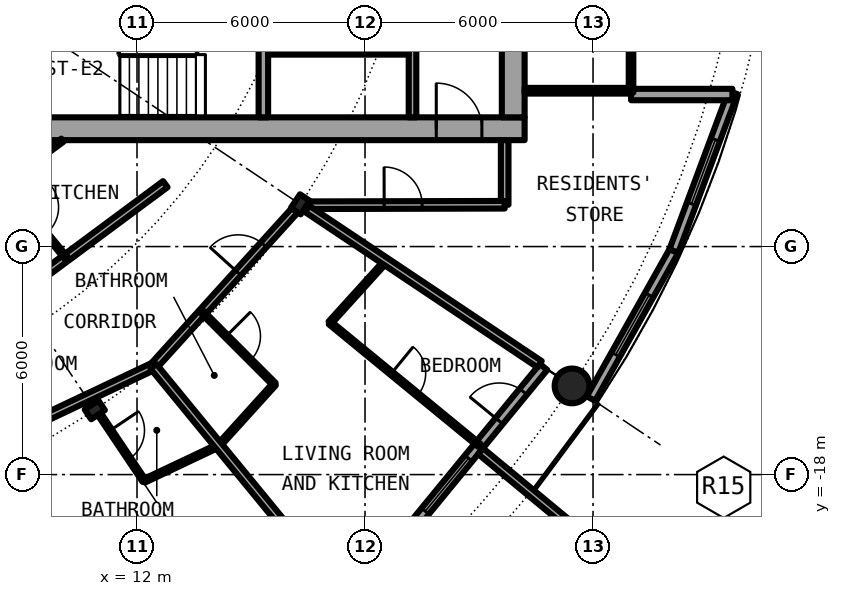
"""IFC4 building model, lengths in metres.
Left out: names, types, materials, properties, quantities, classifications, styles, units other than length and angle.
Written with IfcOpenShell. Run it as: python <this file> out.ifc"""

import sys

from ifc_helpers import new_model, si_unit, direction, frame, frame_2d, origin, origin_2d, place, context, subcontext, project, spatial, rectangle, hollow_circle, i_section, extrude, element, fill, save


model = new_model("IFC4")
c1 = context("Model", 3, precision=1e-05, world=origin(), true_north=direction((0.0, 1.0)))
c2 = subcontext(c1, "Body", "Model", "MODEL_VIEW")
j1 = project(units=[si_unit("LENGTHUNIT", "METRE"), si_unit("PLANEANGLEUNIT", "RADIAN")], contexts=[c1])
p1 = place(None, origin())
s1 = spatial("IfcSite", under=j1, at=p1, CompositionType="ELEMENT")
p2 = place(p1, origin())
s2 = spatial("IfcBuilding", under=s1, at=p2, CompositionType="ELEMENT")
p3 = place(p2, frame((0.0, 0.0, 111.65)))
s3 = spatial("IfcBuildingStorey", under=s2, at=p3, CompositionType="ELEMENT", Elevation=111.65)
p4 = place(p3, frame((23.448, -15.667, 0.0), z_axis=(0.0, 0.0, 1.0), x_axis=(1.0, 0.0, 0.0)))
e1 = element("IfcColumn", 1, at=p4, inside=s3, PredefinedType="COLUMN", context=c2, shape_type="SweptSolid", body=[
    extrude(hollow_circle(Radius=0.457, WallThickness=0.04, at=origin_2d()), origin(), (0.0, 0.0, 1.0), 3.05),
])
for number, where, z_axis, x_axis in (
    (2, (10.889, -16.297, 0.0), (0.0, 0.0, 1.0), (0.556, -0.831, 0.0)),
    (3, (16.297, -10.889, 0.0), (0.0, 0.0, 1.0), (0.831, -0.556, 0.0)),
):
    element("IfcColumn", number, at=place(p3, frame(where, z_axis=z_axis, x_axis=x_axis)), inside=s3, PredefinedType="COLUMN", context=c2, shape_type="SweptSolid", body=[
        extrude(i_section(OverallWidth=0.307, OverallDepth=0.432, WebThickness=0.021, FlangeThickness=0.04, FilletRadius=0.027, at=origin_2d()), origin(), (0.0, 0.0, 1.0), 3.05),
    ])
p5 = place(p3, frame((19.304, -19.304, 0.0), z_axis=(0.0, 0.0, 1.0), x_axis=(0.634382322723, 0.773019449054, 0.0)))
e4 = element("IfcWall", 4, at=p5, inside=s3, PredefinedType="SOLIDWALL", context=c2, shape_type="SweptSolid", body=[
    extrude(rectangle(XDim=5.352, YDim=0.25, at=frame_2d((2.676, 0.0))), origin(), (0.0, 0.0, 1.0), 2.7),
])
p6 = place(p5, frame((0.441, 0.0, 0.3)))
e5 = element("IfcOpeningElement", 5, at=p6, cuts=e4, PredefinedType="OPENING", context=c2, shape_type="SweptSolid", body=[
    extrude(rectangle(XDim=1.8, YDim=2.1, at=frame_2d((0.9, 1.05))), frame((0.0, 0.135, 0.0), z_axis=(0.0, -1.0, 0.0), x_axis=(1.0, 0.0, 0.0)), (0.0, 0.0, 1.0), 0.27),
])
p7 = place(p5, frame((3.51, 0.0, 0.0)))
e6 = element("IfcOpeningElement", 6, at=p7, cuts=e4, PredefinedType="OPENING", context=c2, shape_type="SweptSolid", body=[
    extrude(rectangle(XDim=1.0, YDim=2.2, at=frame_2d((0.5, 1.1))), frame((0.0, 0.135, 0.0), z_axis=(0.0, -1.0, 0.0), x_axis=(1.0, 0.0, 0.0)), (0.0, 0.0, 1.0), 0.27),
])
p8 = place(p3, frame((21.041, -17.384, -0.03), z_axis=(0.0, 0.0, 1.0), x_axis=(0.770784861449, -0.63709551667, 0.0)))
e7 = element("IfcWall", 7, at=p8, inside=s3, PredefinedType="SOLIDWALL", context=c2, shape_type="SweptSolid", body=[
    extrude(rectangle(XDim=3.006, YDim=0.2, at=frame_2d((1.503, 0.0))), origin(), (0.0, 0.0, 1.0), 2.73),
])
p9 = place(p3, frame((23.946, -16.0, 0.0), z_axis=(0.0, 0.0, 1.0), x_axis=(0.489696356642, 0.871893042919, 0.0)))
e8 = element("IfcWall", 8, at=p9, inside=s3, PredefinedType="SOLIDWALL", context=c2, shape_type="SweptSolid", body=[
    extrude(rectangle(XDim=4.454, YDim=0.25, at=frame_2d((2.227, 0.0))), origin(), (0.0, 0.0, 1.0), 2.7),
])
p10 = place(p9, frame((1.327, 0.0, 0.3)))
e9 = element("IfcOpeningElement", 9, at=p10, cuts=e8, PredefinedType="OPENING", context=c2, shape_type="SweptSolid", body=[
    extrude(rectangle(XDim=1.8, YDim=2.1, at=frame_2d((0.9, 1.05))), frame((0.0, 0.135, 0.0), z_axis=(0.0, -1.0, 0.0), x_axis=(1.0, 0.0, 0.0)), (0.0, 0.0, 1.0), 0.27),
])
p11 = place(p3, frame((26.127, -12.117, 0.0), z_axis=(0.0, 0.0, 1.0), x_axis=(0.349247811493, 0.937030397675, 0.0)))
e10 = element("IfcWall", 10, at=p11, inside=s3, PredefinedType="SOLIDWALL", context=c2, shape_type="SweptSolid", body=[
    extrude(rectangle(XDim=4.452, YDim=0.25, at=frame_2d((2.226, 0.0))), origin(), (0.0, 0.0, 1.0), 2.7),
])
p12 = place(p11, frame((1.327, 0.0, 0.3)))
e11 = element("IfcOpeningElement", 11, at=p12, cuts=e10, PredefinedType="OPENING", context=c2, shape_type="SweptSolid", body=[
    extrude(rectangle(XDim=1.8, YDim=2.1, at=frame_2d((0.9, 1.05))), frame((0.0, 0.135, 0.0), z_axis=(0.0, -1.0, 0.0), x_axis=(1.0, 0.0, 0.0)), (0.0, 0.0, 1.0), 0.27),
])
p13 = place(p3, frame((25.0, -8.0, 0.0), z_axis=(0.0, 0.0, 1.0), x_axis=(1.0, 0.0, 0.0)))
e12 = element("IfcWall", 12, at=p13, inside=s3, PredefinedType="SOLIDWALL", context=c2, shape_type="SweptSolid", body=[
    extrude(rectangle(XDim=2.667, YDim=0.3, at=frame_2d((1.333, 0.0))), origin(), (0.0, 0.0, 1.0), 2.7),
])
p14 = place(p3, frame((8.4, -8.9, 0.0), z_axis=(0.0, 0.0, 1.0), x_axis=(1.0, 0.0, 0.0)))
e13 = element("IfcWall", 13, at=p14, inside=s3, PredefinedType="SHEAR", context=c2, shape_type="SweptSolid", body=[
    extrude(rectangle(XDim=13.8, YDim=0.6, at=frame_2d((6.9, 0.0))), origin(), (0.0, 0.0, 1.0), 3.05),
])
p15 = place(p14, frame((11.475, 0.0, 0.0)))
e14 = element("IfcOpeningElement", 14, at=p15, cuts=e13, PredefinedType="OPENING", context=c2, shape_type="SweptSolid", body=[
    extrude(rectangle(XDim=1.2, YDim=2.3, at=frame_2d((0.6, 1.15))), frame((0.0, 0.31, 0.0), z_axis=(0.0, -1.0, 0.0), x_axis=(1.0, 0.0, 0.0)), (0.0, 0.0, 1.0), 0.62),
])
p16 = place(p3, frame((21.9, 8.6, 0.0), z_axis=(0.0, 0.0, 1.0), x_axis=(0.0, -1.0, 0.0)))
e15 = element("IfcWall", 15, at=p16, inside=s3, PredefinedType="SHEAR", context=c2, shape_type="SweptSolid", body=[
    extrude(rectangle(XDim=17.2, YDim=0.6, at=frame_2d((8.6, 0.0))), origin(), (0.0, 0.0, 1.0), 3.05),
])
p17 = place(p16, frame((7.7, 0.0, 0.0)))
e16 = element("IfcOpeningElement", 16, at=p17, cuts=e15, PredefinedType="OPENING", context=c2, shape_type="SweptSolid", body=[
    extrude(rectangle(XDim=1.8, YDim=2.3, at=frame_2d((0.9, 1.15))), frame((0.0, 0.31, 0.0), z_axis=(0.0, -1.0, 0.0), x_axis=(1.0, 0.0, 0.0)), (0.0, 0.0, 1.0), 0.62),
])
p18 = place(p3, frame((15.325, -8.6, 0.0), z_axis=(0.0, 0.0, 1.0), x_axis=(0.0, 1.0, 0.0)))
e17 = element("IfcWall", 17, at=p18, inside=s3, PredefinedType="SHEAR", context=c2, shape_type="SweptSolid", body=[
    extrude(rectangle(XDim=3.95, YDim=0.25, at=frame_2d((1.975, 0.0))), origin(), (0.0, 0.0, 1.0), 3.05),
])
p19 = place(p18, frame((2.025, 0.0, 0.0)))
e18 = element("IfcOpeningElement", 18, at=p19, cuts=e17, PredefinedType="OPENING", context=c2, shape_type="SweptSolid", body=[
    extrude(rectangle(XDim=1.2, YDim=2.3, at=frame_2d((0.6, 1.15))), frame((0.0, 0.135, 0.0), z_axis=(0.0, -1.0, 0.0), x_axis=(1.0, 0.0, 0.0)), (0.0, 0.0, 1.0), 0.27),
])
p20 = place(p3, frame((19.25, -8.6, 0.0), z_axis=(0.0, 0.0, 1.0), x_axis=(0.0, 1.0, 0.0)))
e19 = element("IfcWall", 19, at=p20, inside=s3, PredefinedType="SOLIDWALL", context=c2, shape_type="SweptSolid", body=[
    extrude(rectangle(XDim=7.025, YDim=0.2, at=frame_2d((3.513, 0.0))), origin(), (0.0, 0.0, 1.0), 2.7),
])
p21 = place(p20, frame((2.35, 0.0, 0.0)))
e20 = element("IfcOpeningElement", 20, at=p21, cuts=e19, PredefinedType="OPENING", context=c2, shape_type="SweptSolid", body=[
    extrude(rectangle(XDim=1.1, YDim=2.3, at=frame_2d((0.55, 1.15))), frame((0.0, 0.11, 0.0), z_axis=(0.0, -1.0, 0.0), x_axis=(1.0, 0.0, 0.0)), (0.0, 0.0, 1.0), 0.22),
])
p22 = place(p3, frame((15.45, -6.875, 0.0), z_axis=(0.0, 0.0, 1.0), x_axis=(1.0, 0.0, 0.0)))
e21 = element("IfcWall", 21, at=p22, inside=s3, PredefinedType="PARTITIONING", context=c2, shape_type="SweptSolid", body=[
    extrude(rectangle(XDim=3.7, YDim=0.15, at=frame_2d((1.85, 0.0))), origin(), (0.0, 0.0, 1.0), 2.7),
])
p23 = place(p22, frame((1.4, 0.0, 0.0)))
e22 = element("IfcOpeningElement", 22, at=p23, cuts=e21, PredefinedType="OPENING", context=c2, shape_type="SweptSolid", body=[
    extrude(rectangle(XDim=0.9, YDim=2.3, at=frame_2d((0.45, 1.15))), frame((0.0, 0.085, 0.0), z_axis=(0.0, -1.0, 0.0), x_axis=(1.0, 0.0, 0.0)), (0.0, 0.0, 1.0), 0.17),
])
p24 = place(p3, frame((22.2, -7.9, 0.0), z_axis=(0.0, 0.0, 1.0), x_axis=(1.0, 0.0, 0.0)))
e23 = element("IfcWall", 23, at=p24, inside=s3, PredefinedType="PARTITIONING", context=c2, shape_type="SweptSolid", body=[
    extrude(rectangle(XDim=2.74, YDim=0.15, at=frame_2d((1.37, 0.0))), origin(), (0.0, 0.0, 1.0), 2.7),
])
p25 = place(p3, frame((25.0, -7.95, 0.0), z_axis=(0.0, 0.0, 1.0), x_axis=(0.0, 1.0, 0.0)))
e24 = element("IfcWall", 24, at=p25, inside=s3, PredefinedType="PARTITIONING", context=c2, shape_type="SweptSolid", body=[
    extrude(rectangle(XDim=15.9, YDim=0.12, at=frame_2d((7.95, 0.0))), origin(), (0.0, 0.0, 1.0), 2.7),
])
p26 = place(p25, frame((0.95, 0.0, 0.1)))
e25 = element("IfcOpeningElement", 25, at=p26, cuts=e24, PredefinedType="OPENING", context=c2, shape_type="SweptSolid", body=[
    extrude(rectangle(XDim=14.0, YDim=2.35, at=frame_2d((7.0, 1.175))), frame((0.0, 0.07, 0.0), z_axis=(0.0, -1.0, 0.0), x_axis=(1.0, 0.0, 0.0)), (0.0, 0.0, 1.0), 0.14),
])
p27 = place(p3, frame((14.153, -17.234, 0.0), z_axis=(0.0, 0.0, 1.0), x_axis=(0.671144831591, 0.741326254107, 0.0)))
e26 = element("IfcWall", 26, at=p27, inside=s3, PredefinedType="PARTITIONING", context=c2, shape_type="SweptSolid", body=[
    extrude(rectangle(XDim=2.181, YDim=0.1, at=frame_2d((1.091, 0.0))), origin(), (0.0, 0.0, 1.0), 2.7),
])
p28 = place(p3, frame((17.077, -14.006, 0.0), z_axis=(0.0, 0.0, 1.0), x_axis=(0.671396556615, 0.741098282123, 0.0)))
e27 = element("IfcWall", 27, at=p28, inside=s3, PredefinedType="PARTITIONING", context=c2, shape_type="SweptSolid", body=[
    extrude(rectangle(XDim=2.182, YDim=0.1, at=frame_2d((1.091, 0.0))), origin(), (0.0, 0.0, 1.0), 2.7),
])
p29 = place(p3, frame((21.675, -10.9, 0.0), z_axis=(0.0, 0.0, 1.0), x_axis=(0.0, 1.0, 0.0)))
e28 = element("IfcWall", 28, at=p29, inside=s3, PredefinedType="PARTITIONING", context=c2, shape_type="SweptSolid", body=[
    extrude(rectangle(XDim=1.7, YDim=0.2, at=frame_2d((0.85, 0.0))), origin(), (0.0, 0.0, 1.0), 2.7),
])
p30 = place(p3, frame((12.188, -18.165, 0.0), z_axis=(0.0, 0.0, 1.0), x_axis=(0.903905215872, 0.427732814639, 0.0)))
e29 = element("IfcWall", 29, at=p30, inside=s3, PredefinedType="PARTITIONING", context=c2, shape_type="SweptSolid", body=[
    extrude(rectangle(XDim=2.167, YDim=0.1, at=frame_2d((1.083, 0.0))), origin(), (0.0, 0.0, 1.0), 2.7),
])
p31 = place(p3, frame((12.434, -15.151, 0.0), z_axis=(0.0, 0.0, 1.0), x_axis=(0.671481997275, 0.741020868354, 0.0)))
e30 = element("IfcWall", 30, at=p31, inside=s3, PredefinedType="PARTITIONING", context=c2, shape_type="SweptSolid", body=[
    extrude(rectangle(XDim=5.596, YDim=0.2, at=frame_2d((2.798, 0.0))), origin(), (0.0, 0.0, 1.0), 2.39),
])
p32 = place(p31, frame((3.319, 0.0, 0.0)))
e31 = element("IfcOpeningElement", 31, at=p32, cuts=e30, PredefinedType="OPENING", context=c2, shape_type="SweptSolid", body=[
    extrude(rectangle(XDim=1.0, YDim=2.3, at=frame_2d((0.5, 1.15))), frame((0.0, 0.11, 0.0), z_axis=(0.0, -1.0, 0.0), x_axis=(1.0, 0.0, 0.0)), (0.0, 0.0, 1.0), 0.22),
])
p33 = place(p3, frame((3.967, -19.155, 0.0), z_axis=(0.0, 0.0, 1.0), x_axis=(0.904003983145, 0.427524032609, 0.0)))
e32 = element("IfcWall", 32, at=p33, inside=s3, PredefinedType="PARTITIONING", context=c2, shape_type="SweptSolid", body=[
    extrude(rectangle(XDim=9.37, YDim=0.2, at=frame_2d((4.685, 0.0))), origin(), (0.0, 0.0, 1.0), 2.39),
])
p34 = place(p33, frame((5.056, 0.0, 0.0)))
e33 = element("IfcOpeningElement", 33, at=p34, cuts=e32, PredefinedType="OPENING", context=c2, shape_type="SweptSolid", body=[
    extrude(rectangle(XDim=1.0, YDim=2.3, at=frame_2d((0.5, 1.15))), frame((0.0, 0.11, 0.0), z_axis=(0.0, -1.0, 0.0), x_axis=(1.0, 0.0, 0.0)), (0.0, 0.0, 1.0), 0.22),
])
p35 = place(p3, frame((4.906, -16.172, 0.0), z_axis=(0.0, 0.0, 1.0), x_axis=(0.803191461888, 0.595720971219, 0.0)))
e34 = element("IfcWall", 34, at=p35, inside=s3, PredefinedType="PARTITIONING", context=c2, shape_type="SweptSolid", body=[
    extrude(rectangle(XDim=9.76, YDim=0.2, at=frame_2d((4.88, 0.0))), origin(), (0.0, 0.0, 1.0), 2.7),
])
p36 = place(p35, frame((4.38, 0.0, 0.0)))
e35 = element("IfcOpeningElement", 35, at=p36, cuts=e34, PredefinedType="OPENING", context=c2, shape_type="SweptSolid", body=[
    extrude(rectangle(XDim=1.0, YDim=2.3, at=frame_2d((0.5, 1.15))), frame((0.0, 0.11, 0.0), z_axis=(0.0, -1.0, 0.0), x_axis=(1.0, 0.0, 0.0)), (0.0, 0.0, 1.0), 0.22),
])
p37 = place(p3, frame((8.513, -10.332, 0.0), z_axis=(0.0, 0.0, 1.0), x_axis=(0.803149591038, 0.595777420196, 0.0)))
e36 = element("IfcWall", 36, at=p37, inside=s3, PredefinedType="PARTITIONING", context=c2, shape_type="SweptSolid", body=[
    extrude(rectangle(XDim=1.9, YDim=0.1, at=frame_2d((0.95, 0.0))), origin(), (0.0, 0.0, 1.0), 2.7),
])
p38 = place(p3, frame((16.541, -10.912, 0.0), z_axis=(0.0, 0.0, 1.0), x_axis=(0.999997173357, 0.002377662213, 0.0)))
e37 = element("IfcWall", 37, at=p38, inside=s3, PredefinedType="PARTITIONING", context=c2, shape_type="SweptSolid", body=[
    extrude(rectangle(XDim=5.134, YDim=0.2, at=frame_2d((2.567, 0.0))), origin(), (0.0, 0.0, 1.0), 2.7),
])
p39 = place(p38, frame((1.963, 0.0, 0.0)))
e38 = element("IfcOpeningElement", 38, at=p39, cuts=e37, PredefinedType="OPENING", context=c2, shape_type="SweptSolid", body=[
    extrude(rectangle(XDim=1.0, YDim=2.3, at=frame_2d((0.5, 1.15))), frame((0.0, 0.11, 0.0), z_axis=(0.0, -1.0, 0.0), x_axis=(1.0, 0.0, 0.0)), (0.0, 0.0, 1.0), 0.22),
])
p40 = place(p3, frame((4.908, -5.959, 0.0), z_axis=(0.0, 0.0, 1.0), x_axis=(0.636105207978, -0.771602335652, 0.0)))
e39 = element("IfcWall", 39, at=p40, inside=s3, PredefinedType="PARTITIONING", context=c2, shape_type="SweptSolid", body=[
    extrude(rectangle(XDim=8.213, YDim=0.1, at=frame_2d((4.106, 0.0))), origin(), (0.0, 0.0, 1.0), 2.7),
])
p41 = place(p40, frame((6.49, 0.0, 0.0)))
e40 = element("IfcOpeningElement", 40, at=p41, cuts=e39, PredefinedType="OPENING", context=c2, shape_type="SweptSolid", body=[
    extrude(rectangle(XDim=0.9, YDim=2.3, at=frame_2d((0.45, 1.15))), frame((0.0, 0.06, 0.0), z_axis=(0.0, -1.0, 0.0), x_axis=(1.0, 0.0, 0.0)), (0.0, 0.0, 1.0), 0.12),
])
p42 = place(p40, frame((2.384, 0.0, 0.0)))
e41 = element("IfcOpeningElement", 41, at=p42, cuts=e39, PredefinedType="OPENING", context=c2, shape_type="SweptSolid", body=[
    extrude(rectangle(XDim=0.9, YDim=2.3, at=frame_2d((0.45, 1.15))), frame((0.0, 0.06, 0.0), z_axis=(0.0, -1.0, 0.0), x_axis=(1.0, 0.0, 0.0)), (0.0, 0.0, 1.0), 0.12),
])
p43 = place(p3, frame((7.268, -17.594, 0.0), z_axis=(0.0, 0.0, 1.0), x_axis=(0.381763497026, -0.924260045841, 0.0)))
e42 = element("IfcWall", 42, at=p43, inside=s3, PredefinedType="PARTITIONING", context=c2, shape_type="SweptSolid", body=[
    extrude(rectangle(XDim=8.138, YDim=0.1, at=frame_2d((4.069, 0.0))), origin(), (0.0, 0.0, 1.0), 2.7),
])
p44 = place(p43, frame((0.861, 0.0, 0.0)))
e43 = element("IfcOpeningElement", 43, at=p44, cuts=e42, PredefinedType="OPENING", context=c2, shape_type="SweptSolid", body=[
    extrude(rectangle(XDim=0.9, YDim=2.3, at=frame_2d((0.45, 1.15))), frame((0.0, 0.06, 0.0), z_axis=(0.0, -1.0, 0.0), x_axis=(1.0, 0.0, 0.0)), (0.0, 0.0, 1.0), 0.12),
])
p45 = place(p43, frame((4.93, 0.0, 0.0)))
e44 = element("IfcOpeningElement", 44, at=p45, cuts=e42, PredefinedType="OPENING", context=c2, shape_type="SweptSolid", body=[
    extrude(rectangle(XDim=0.9, YDim=2.3, at=frame_2d((0.45, 1.15))), frame((0.0, 0.06, 0.0), z_axis=(0.0, -1.0, 0.0), x_axis=(1.0, 0.0, 0.0)), (0.0, 0.0, 1.0), 0.12),
])
p46 = place(p3, frame((11.041, -16.455, 0.0), z_axis=(0.0, 0.0, 1.0), x_axis=(0.557051175603, -0.830478168141, 0.0)))
e45 = element("IfcWall", 45, at=p46, inside=s3, PredefinedType="PARTITIONING", context=c2, shape_type="SweptSolid", body=[
    extrude(rectangle(XDim=2.059, YDim=0.1, at=frame_2d((1.03, 0.0))), origin(), (0.0, 0.0, 1.0), 2.7),
])
p47 = place(p46, frame((0.46, 0.0, 0.0)))
e46 = element("IfcOpeningElement", 46, at=p47, cuts=e45, PredefinedType="OPENING", context=c2, shape_type="SweptSolid", body=[
    extrude(rectangle(XDim=0.9, YDim=2.3, at=frame_2d((0.45, 1.15))), frame((0.0, 0.06, 0.0), z_axis=(0.0, -1.0, 0.0), x_axis=(1.0, 0.0, 0.0)), (0.0, 0.0, 1.0), 0.12),
])
p48 = place(p3, frame((12.432, -15.152, 0.0), z_axis=(0.0, 0.0, 1.0), x_axis=(0.634353152115, -0.77304338714, 0.0)))
e47 = element("IfcWall", 47, at=p48, inside=s3, PredefinedType="PARTITIONING", context=c2, shape_type="SweptSolid", body=[
    extrude(rectangle(XDim=7.576, YDim=0.2, at=frame_2d((3.788, 0.0))), origin(), (0.0, 0.0, 1.0), 2.7),
])
p49 = place(p3, frame((13.722, -13.73, 0.0), z_axis=(0.0, 0.0, 1.0), x_axis=(0.706741540154, -0.707471833659, 0.0)))
e48 = element("IfcWall", 48, at=p49, inside=s3, PredefinedType="PARTITIONING", context=c2, shape_type="SweptSolid", body=[
    extrude(rectangle(XDim=2.674, YDim=0.1, at=frame_2d((1.337, 0.0))), origin(), (0.0, 0.0, 1.0), 2.7),
])
p50 = place(p49, frame((0.887, 0.0, 0.0)))
e49 = element("IfcOpeningElement", 49, at=p50, cuts=e48, PredefinedType="OPENING", context=c2, shape_type="SweptSolid", body=[
    extrude(rectangle(XDim=0.9, YDim=2.3, at=frame_2d((0.45, 1.15))), frame((0.0, 0.06, 0.0), z_axis=(0.0, -1.0, 0.0), x_axis=(1.0, 0.0, 0.0)), (0.0, 0.0, 1.0), 0.12),
])
p51 = place(p3, frame((16.477, -11.009, 0.0), z_axis=(0.0, 0.0, 1.0), x_axis=(0.831467903109, -0.555572791, 0.0)))
e50 = element("IfcWall", 50, at=p51, inside=s3, PredefinedType="PARTITIONING", context=c2, shape_type="SweptSolid", body=[
    extrude(rectangle(XDim=7.358, YDim=0.2, at=frame_2d((3.679, 0.0))), origin(), (0.0, 0.0, 1.0), 2.7),
])
p52 = place(p3, frame((17.077, -14.006, 0.0), z_axis=(0.0, 0.0, 1.0), x_axis=(0.77326214499, -0.634086472908, 0.0)))
e51 = element("IfcWall", 51, at=p52, inside=s3, PredefinedType="PARTITIONING", context=c2, shape_type="SweptSolid", body=[
    extrude(rectangle(XDim=5.089, YDim=0.1, at=frame_2d((2.544, 0.0))), origin(), (0.0, 0.0, 1.0), 2.7),
])
p53 = place(p52, frame((2.094, 0.0, 0.0)))
e52 = element("IfcOpeningElement", 52, at=p53, cuts=e51, PredefinedType="OPENING", context=c2, shape_type="SweptSolid", body=[
    extrude(rectangle(XDim=0.9, YDim=2.3, at=frame_2d((0.45, 1.15))), frame((0.0, 0.06, 0.0), z_axis=(0.0, -1.0, 0.0), x_axis=(1.0, 0.0, 0.0)), (0.0, 0.0, 1.0), 0.12),
])
p54 = place(p6, origin())
e53 = element("IfcWindow", 53, at=p54, inside=s3, PartitioningType="SINGLE_PANEL", PredefinedType="WINDOW", context=c2, shape_type="SweptSolid", body=[
    extrude(rectangle(XDim=1.8, YDim=2.1, at=frame_2d((0.9, 1.05))), frame((0.0, 0.03, 0.0), z_axis=(0.0, -1.0, 0.0), x_axis=(1.0, 0.0, 0.0)), (0.0, 0.0, 1.0), 0.06),
])
fill(e5, e53)
p55 = place(p7, origin())
e54 = element("IfcDoor", 54, at=p55, inside=s3, OperationType="SINGLE_SWING_LEFT", PredefinedType="DOOR", context=c2, shape_type="SweptSolid", body=[
    extrude(rectangle(XDim=1.0, YDim=2.2, at=frame_2d((0.5, 1.1))), frame((0.0, 0.025, 0.0), z_axis=(0.0, -1.0, 0.0), x_axis=(1.0, 0.0, 0.0)), (0.0, 0.0, 1.0), 0.05),
])
fill(e6, e54)
p56 = place(p10, origin())
e55 = element("IfcWindow", 55, at=p56, inside=s3, PartitioningType="SINGLE_PANEL", PredefinedType="WINDOW", context=c2, shape_type="SweptSolid", body=[
    extrude(rectangle(XDim=1.8, YDim=2.1, at=frame_2d((0.9, 1.05))), frame((0.0, 0.03, 0.0), z_axis=(0.0, -1.0, 0.0), x_axis=(1.0, 0.0, 0.0)), (0.0, 0.0, 1.0), 0.06),
])
fill(e9, e55)
p57 = place(p12, origin())
e56 = element("IfcWindow", 56, at=p57, inside=s3, PartitioningType="SINGLE_PANEL", PredefinedType="WINDOW", context=c2, shape_type="SweptSolid", body=[
    extrude(rectangle(XDim=1.8, YDim=2.1, at=frame_2d((0.9, 1.05))), frame((0.0, 0.03, 0.0), z_axis=(0.0, -1.0, 0.0), x_axis=(1.0, 0.0, 0.0)), (0.0, 0.0, 1.0), 0.06),
])
fill(e11, e56)
p58 = place(p23, origin())
e57 = element("IfcDoor", 57, at=p58, inside=s3, OperationType="SINGLE_SWING_LEFT", PredefinedType="DOOR", context=c2, shape_type="SweptSolid", body=[
    extrude(rectangle(XDim=0.9, YDim=2.3, at=frame_2d((0.45, 1.15))), frame((0.0, 0.025, 0.0), z_axis=(0.0, -1.0, 0.0), x_axis=(1.0, 0.0, 0.0)), (0.0, 0.0, 1.0), 0.05),
])
fill(e22, e57)
p59 = place(p15, origin())
e58 = element("IfcDoor", 58, at=p59, inside=s3, OperationType="SINGLE_SWING_LEFT", PredefinedType="DOOR", context=c2, shape_type="SweptSolid", body=[
    extrude(rectangle(XDim=1.2, YDim=2.3, at=frame_2d((0.6, 1.15))), frame((0.0, 0.025, 0.0), z_axis=(0.0, -1.0, 0.0), x_axis=(1.0, 0.0, 0.0)), (0.0, 0.0, 1.0), 0.05),
])
fill(e14, e58)
p60 = place(p26, origin())
e59 = element("IfcWindow", 59, at=p60, inside=s3, PartitioningType="SINGLE_PANEL", PredefinedType="WINDOW", context=c2, shape_type="SweptSolid", body=[
    extrude(rectangle(XDim=14.0, YDim=2.35, at=frame_2d((7.0, 1.175))), frame((0.0, 0.03, 0.0), z_axis=(0.0, -1.0, 0.0), x_axis=(1.0, 0.0, 0.0)), (0.0, 0.0, 1.0), 0.06),
])
fill(e25, e59)
p61 = place(p47, origin())
e60 = element("IfcDoor", 60, at=p61, inside=s3, OperationType="SINGLE_SWING_LEFT", PredefinedType="DOOR", context=c2, shape_type="SweptSolid", body=[
    extrude(rectangle(XDim=0.9, YDim=2.3, at=frame_2d((0.45, 1.15))), frame((0.0, 0.025, 0.0), z_axis=(0.0, -1.0, 0.0), x_axis=(1.0, 0.0, 0.0)), (0.0, 0.0, 1.0), 0.05),
])
fill(e46, e60)
p62 = place(p32, origin())
e61 = element("IfcDoor", 61, at=p62, inside=s3, OperationType="SINGLE_SWING_RIGHT", PredefinedType="DOOR", context=c2, shape_type="SweptSolid", body=[
    extrude(rectangle(XDim=1.0, YDim=2.3, at=frame_2d((0.5, 1.15))), frame((0.0, 0.025, 0.0), z_axis=(0.0, -1.0, 0.0), x_axis=(1.0, 0.0, 0.0)), (0.0, 0.0, 1.0), 0.05),
])
fill(e31, e61)
p63 = place(p50, origin())
e62 = element("IfcDoor", 62, at=p63, inside=s3, OperationType="SINGLE_SWING_RIGHT", PredefinedType="DOOR", context=c2, shape_type="SweptSolid", body=[
    extrude(rectangle(XDim=0.9, YDim=2.3, at=frame_2d((0.45, 1.15))), frame((0.0, 0.025, 0.0), z_axis=(0.0, -1.0, 0.0), x_axis=(1.0, 0.0, 0.0)), (0.0, 0.0, 1.0), 0.05),
])
fill(e49, e62)
p64 = place(p53, origin())
e63 = element("IfcDoor", 63, at=p64, inside=s3, OperationType="SINGLE_SWING_LEFT", PredefinedType="DOOR", context=c2, shape_type="SweptSolid", body=[
    extrude(rectangle(XDim=0.9, YDim=2.3, at=frame_2d((0.45, 1.15))), frame((0.0, 0.025, 0.0), z_axis=(0.0, -1.0, 0.0), x_axis=(1.0, 0.0, 0.0)), (0.0, 0.0, 1.0), 0.05),
])
fill(e52, e63)
p65 = place(p39, origin())
e64 = element("IfcDoor", 64, at=p65, inside=s3, OperationType="SINGLE_SWING_LEFT", PredefinedType="DOOR", context=c2, shape_type="SweptSolid", body=[
    extrude(rectangle(XDim=1.0, YDim=2.3, at=frame_2d((0.5, 1.15))), frame((0.0, 0.025, 0.0), z_axis=(0.0, -1.0, 0.0), x_axis=(1.0, 0.0, 0.0)), (0.0, 0.0, 1.0), 0.05),
])
fill(e38, e64)
save(model, sys.argv[1])
